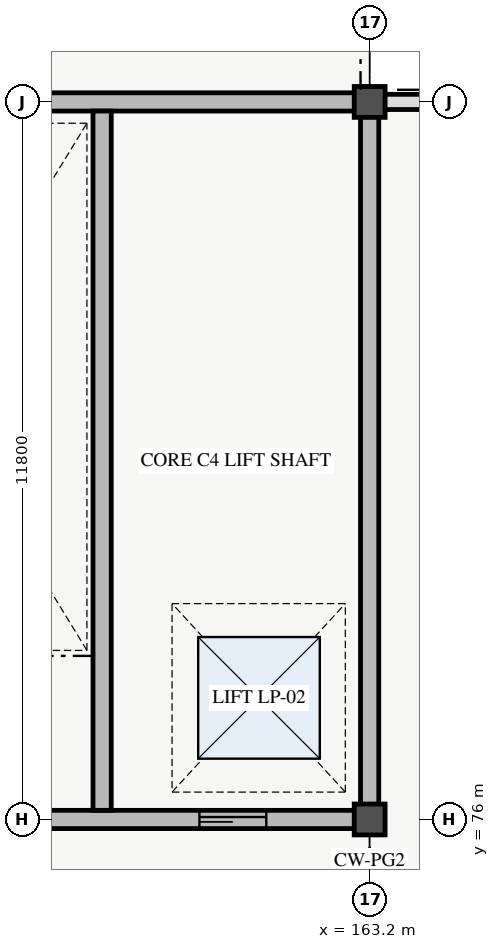
"""IFC4 building model, lengths in metres.
Left out: names, types, materials, properties, quantities, classifications, styles, units other than length and angle.
Written with IfcOpenShell. Run it as: python <this file> out.ifc"""

import sys

from ifc_helpers import new_model, si_unit, direction, frame, frame_2d, origin, origin_2d, place, context, subcontext, project, spatial, rectangle, hollow_circle, extrude, element, fill, save


model = new_model("IFC4")
c1 = context("Model", 3, precision=1e-05, world=origin(), true_north=direction((0.0, 1.0)))
c2 = subcontext(c1, "Body", "Model", "MODEL_VIEW")
j1 = project(units=[si_unit("LENGTHUNIT", "METRE"), si_unit("PLANEANGLEUNIT", "RADIAN")], contexts=[c1])
p1 = place(None, origin())
s1 = spatial("IfcSite", under=j1, at=p1, CompositionType="ELEMENT")
p2 = place(p1, origin())
s2 = spatial("IfcBuilding", under=s1, at=p2, CompositionType="ELEMENT")
p3 = place(p2, frame((0.0, 0.0, 10.8)))
s3 = spatial("IfcBuildingStorey", under=s2, at=p3, CompositionType="ELEMENT", Elevation=10.8)
for number, where, z_axis, x_axis in (
    (1, (163.2, 76.0, 0.0), (0.0, 0.0, 1.0), (1.0, 0.0, 0.0)),
    (2, (163.2, 87.8, 0.0), (0.0, 0.0, 1.0), (1.0, 0.0, 0.0)),
):
    element("IfcColumn", number, at=place(p3, frame(where, z_axis=z_axis, x_axis=x_axis)), inside=s3, PredefinedType="COLUMN", context=c2, shape_type="SweptSolid", body=[
        extrude(hollow_circle(Radius=0.254, WallThickness=0.02, at=origin_2d()), origin(), (0.0, 0.0, 1.0), 4.2),
    ])
p4 = place(p3, frame((153.0, 76.0, 0.0), z_axis=(0.0, 0.0, 1.0), x_axis=(1.0, 0.0, 0.0)))
e3 = element("IfcWall", 3, at=p4, inside=s3, PredefinedType="SHEAR", context=c2, shape_type="SweptSolid", body=[
    extrude(rectangle(XDim=10.2, YDim=0.3, at=frame_2d((5.1, 0.0))), origin(), (0.0, 0.0, 1.0), 4.2),
])
p5 = place(p4, frame((7.4, 0.0, 0.0)))
e4 = element("IfcOpeningElement", 4, at=p5, cuts=e3, PredefinedType="OPENING", context=c2, shape_type="SweptSolid", body=[
    extrude(rectangle(XDim=1.1, YDim=2.2, at=frame_2d((0.55, 1.1))), frame((0.0, 0.16, 0.0), z_axis=(0.0, -1.0, 0.0), x_axis=(1.0, 0.0, 0.0)), (0.0, 0.0, 1.0), 0.32),
])
p6 = place(p3, frame((153.0, 87.8, 0.0), z_axis=(0.0, 0.0, 1.0), x_axis=(1.0, 0.0, 0.0)))
e5 = element("IfcWall", 5, at=p6, inside=s3, PredefinedType="SHEAR", context=c2, shape_type="SweptSolid", body=[
    extrude(rectangle(XDim=10.2, YDim=0.3, at=frame_2d((5.1, 0.0))), origin(), (0.0, 0.0, 1.0), 4.2),
])
p7 = place(p3, frame((163.2, 76.0, 0.0), z_axis=(0.0, 0.0, 1.0), x_axis=(0.0, 1.0, 0.0)))
e6 = element("IfcWall", 6, at=p7, inside=s3, PredefinedType="SHEAR", context=c2, shape_type="SweptSolid", body=[
    extrude(rectangle(XDim=11.8, YDim=0.3, at=frame_2d((5.9, 0.0))), origin(), (0.0, 0.0, 1.0), 4.2),
])
p8 = place(p3, frame((163.44, 87.8, 0.0), z_axis=(0.0, 0.0, 1.0), x_axis=(1.0, 0.0, 0.0)))
e7 = element("IfcWall", 7, at=p8, inside=s3, PredefinedType="SOLIDWALL", context=c2, shape_type="SweptSolid", body=[
    extrude(rectangle(XDim=9.72, YDim=0.25, at=frame_2d((4.86, 0.0))), origin(), (0.0, 0.0, 1.0), 3.06),
])
p9 = place(p3, frame((158.8, 76.15, 0.0), z_axis=(0.0, 0.0, 1.0), x_axis=(0.0, 1.0, 0.0)))
e8 = element("IfcWall", 8, at=p9, inside=s3, PredefinedType="SHEAR", context=c2, shape_type="SweptSolid", body=[
    extrude(rectangle(XDim=11.5, YDim=0.3, at=frame_2d((5.75, 0.0))), origin(), (0.0, 0.0, 1.0), 4.2),
])
p10 = place(p5, origin())
e9 = element("IfcDoor", 9, at=p10, inside=s3, OperationType="SLIDING_TO_RIGHT", PredefinedType="DOOR", context=c2, shape_type="SweptSolid", body=[
    extrude(rectangle(XDim=1.1, YDim=2.2, at=frame_2d((0.55, 1.1))), frame((0.0, 0.025, 0.0), z_axis=(0.0, -1.0, 0.0), x_axis=(1.0, 0.0, 0.0)), (0.0, 0.0, 1.0), 0.05),
])
fill(e4, e9)
save(model, sys.argv[1])
